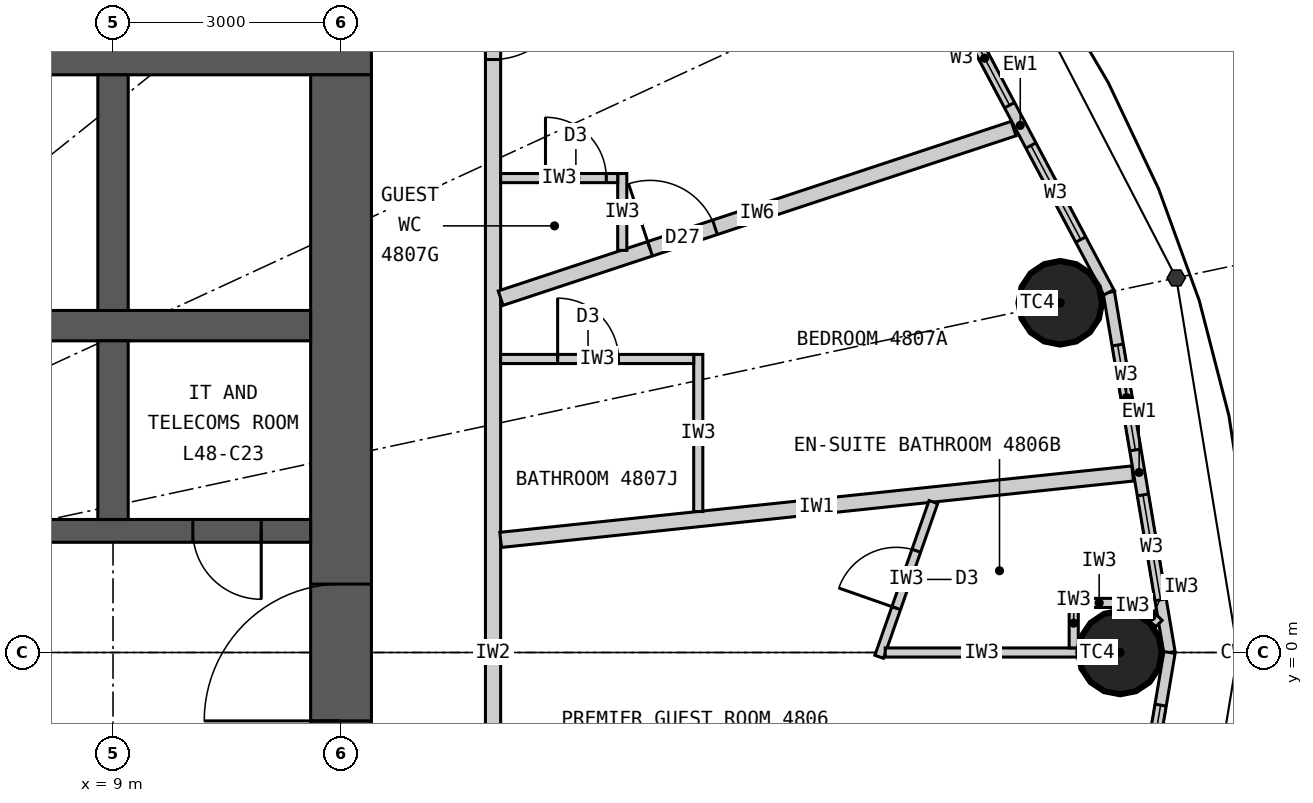
"""IFC4 building model, lengths in metres.
Left out: names, types, materials, properties, quantities, classifications, styles, units other than length and angle.
Written with IfcOpenShell. Run it as: python <this file> out.ifc"""

import sys

from ifc_helpers import new_model, si_unit, direction, frame, frame_2d, origin, origin_2d, place, context, subcontext, project, spatial, rectangle, circle, extrude, element, fill, save


model = new_model("IFC4")
c1 = context("Model", 3, precision=1e-05, world=origin(), true_north=direction((0.0, 1.0)))
c2 = subcontext(c1, "Body", "Model", "MODEL_VIEW")
j1 = project(units=[si_unit("LENGTHUNIT", "METRE"), si_unit("PLANEANGLEUNIT", "RADIAN")], contexts=[c1])
p1 = place(None, origin())
s1 = spatial("IfcSite", under=j1, at=p1, CompositionType="ELEMENT")
p2 = place(p1, origin())
s2 = spatial("IfcBuilding", under=s1, at=p2, CompositionType="ELEMENT")
p3 = place(p2, frame((0.0, 0.0, 179.7)))
s3 = spatial("IfcBuildingStorey", under=s2, at=p3, CompositionType="ELEMENT", Elevation=179.7)
for number, where, z_axis, x_axis in (
    (1, (22.25, 0.0, 0.0), (0.0, 0.0, 1.0), (1.0, 0.0, 0.0)),
    (2, (21.463, 4.601, 0.0), (0.0, 0.0, 1.0), (1.0, 0.0, 0.0)),
):
    element("IfcColumn", number, at=place(p3, frame(where, z_axis=z_axis, x_axis=x_axis)), inside=s3, PredefinedType="COLUMN", context=c2, shape_type="SweptSolid", body=[
        extrude(circle(Radius=0.55, at=origin_2d()), origin(), (0.0, 0.0, 1.0), 3.3),
    ])
p4 = place(p3, frame((-12.4, 8.0, 0.0), z_axis=(0.0, 0.0, 1.0), x_axis=(1.0, 0.0, 0.0)))
e3 = element("IfcWall", 3, at=p4, inside=s3, PredefinedType="SHEAR", context=c2, shape_type="SweptSolid", body=[
    extrude(rectangle(XDim=24.8, YDim=0.8, at=frame_2d((12.4, 0.0))), origin(), (0.0, 0.0, 1.0), 3.3),
])
p5 = place(p4, frame((11.1, 0.0, 0.0)))
e4 = element("IfcOpeningElement", 4, at=p5, cuts=e3, PredefinedType="OPENING", context=c2, shape_type="SweptSolid", body=[
    extrude(rectangle(XDim=1.2, YDim=2.2, at=frame_2d((0.6, 1.1))), frame((0.0, 0.41, 0.0), z_axis=(0.0, -1.0, 0.0), x_axis=(1.0, 0.0, 0.0)), (0.0, 0.0, 1.0), 0.82),
])
p6 = place(p4, frame((18.7, 0.0, 0.0)))
e5 = element("IfcOpeningElement", 5, at=p6, cuts=e3, PredefinedType="OPENING", context=c2, shape_type="SweptSolid", body=[
    extrude(rectangle(XDim=0.9, YDim=2.2, at=frame_2d((0.45, 1.1))), frame((0.0, 0.41, 0.0), z_axis=(0.0, -1.0, 0.0), x_axis=(1.0, 0.0, 0.0)), (0.0, 0.0, 1.0), 0.82),
])
p7 = place(p3, frame((12.0, -7.6, 0.0), z_axis=(0.0, 0.0, 1.0), x_axis=(0.0, 1.0, 0.0)))
e6 = element("IfcWall", 6, at=p7, inside=s3, PredefinedType="SHEAR", context=c2, shape_type="SweptSolid", body=[
    extrude(rectangle(XDim=15.2, YDim=0.8, at=frame_2d((7.6, 0.0))), origin(), (0.0, 0.0, 1.0), 3.3),
])
p8 = place(p7, frame((6.7, 0.0, 0.0)))
e7 = element("IfcOpeningElement", 7, at=p8, cuts=e6, PredefinedType="OPENING", context=c2, shape_type="SweptSolid", body=[
    extrude(rectangle(XDim=1.8, YDim=2.2, at=frame_2d((0.9, 1.1))), frame((0.0, 0.41, 0.0), z_axis=(0.0, -1.0, 0.0), x_axis=(1.0, 0.0, 0.0)), (0.0, 0.0, 1.0), 0.82),
])
p9 = place(p3, frame((-11.6, 4.3, 0.0), z_axis=(0.0, 0.0, 1.0), x_axis=(1.0, 0.0, 0.0)))
e8 = element("IfcWall", 8, at=p9, inside=s3, PredefinedType="SHEAR", context=c2, shape_type="SweptSolid", body=[
    extrude(rectangle(XDim=23.2, YDim=0.4, at=frame_2d((11.6, 0.0))), origin(), (0.0, 0.0, 1.0), 3.3),
])
p10 = place(p3, frame((-11.6, 1.6, 0.0), z_axis=(0.0, 0.0, 1.0), x_axis=(1.0, 0.0, 0.0)))
e9 = element("IfcWall", 9, at=p10, inside=s3, PredefinedType="SHEAR", context=c2, shape_type="SweptSolid", body=[
    extrude(rectangle(XDim=23.2, YDim=0.3, at=frame_2d((11.6, 0.0))), origin(), (0.0, 0.0, 1.0), 3.3),
])
p11 = place(p10, frame((9.55, 0.0, 0.0)))
e10 = element("IfcOpeningElement", 10, at=p11, cuts=e9, PredefinedType="OPENING", context=c2, shape_type="SweptSolid", body=[
    extrude(rectangle(XDim=1.1, YDim=2.2, at=frame_2d((0.55, 1.1))), frame((0.0, 0.16, 0.0), z_axis=(0.0, -1.0, 0.0), x_axis=(1.0, 0.0, 0.0)), (0.0, 0.0, 1.0), 0.32),
])
p12 = place(p10, frame((12.55, 0.0, 0.0)))
e11 = element("IfcOpeningElement", 11, at=p12, cuts=e9, PredefinedType="OPENING", context=c2, shape_type="SweptSolid", body=[
    extrude(rectangle(XDim=1.1, YDim=2.2, at=frame_2d((0.55, 1.1))), frame((0.0, 0.16, 0.0), z_axis=(0.0, -1.0, 0.0), x_axis=(1.0, 0.0, 0.0)), (0.0, 0.0, 1.0), 0.32),
])
p13 = place(p10, frame((0.65, 0.0, 0.0)))
e12 = element("IfcOpeningElement", 12, at=p13, cuts=e9, PredefinedType="OPENING", context=c2, shape_type="SweptSolid", body=[
    extrude(rectangle(XDim=0.9, YDim=2.2, at=frame_2d((0.45, 1.1))), frame((0.0, 0.16, 0.0), z_axis=(0.0, -1.0, 0.0), x_axis=(1.0, 0.0, 0.0)), (0.0, 0.0, 1.0), 0.32),
])
p14 = place(p10, frame((5.15, 0.0, 0.0)))
e13 = element("IfcOpeningElement", 13, at=p14, cuts=e9, PredefinedType="OPENING", context=c2, shape_type="SweptSolid", body=[
    extrude(rectangle(XDim=0.9, YDim=2.2, at=frame_2d((0.45, 1.1))), frame((0.0, 0.16, 0.0), z_axis=(0.0, -1.0, 0.0), x_axis=(1.0, 0.0, 0.0)), (0.0, 0.0, 1.0), 0.32),
])
p15 = place(p10, frame((21.65, 0.0, 0.0)))
e14 = element("IfcOpeningElement", 14, at=p15, cuts=e9, PredefinedType="OPENING", context=c2, shape_type="SweptSolid", body=[
    extrude(rectangle(XDim=0.9, YDim=2.2, at=frame_2d((0.45, 1.1))), frame((0.0, 0.16, 0.0), z_axis=(0.0, -1.0, 0.0), x_axis=(1.0, 0.0, 0.0)), (0.0, 0.0, 1.0), 0.32),
])
p16 = place(p3, frame((9.0, 4.5, 0.0), z_axis=(0.0, 0.0, 1.0), x_axis=(0.0, 1.0, 0.0)))
e15 = element("IfcWall", 15, at=p16, inside=s3, PredefinedType="SHEAR", context=c2, shape_type="SweptSolid", body=[
    extrude(rectangle(XDim=3.1, YDim=0.4, at=frame_2d((1.55, 0.0))), origin(), (0.0, 0.0, 1.0), 3.3),
])
p17 = place(p3, frame((9.0, 1.75, 0.0), z_axis=(0.0, 0.0, 1.0), x_axis=(0.0, 1.0, 0.0)))
e16 = element("IfcWall", 16, at=p17, inside=s3, PredefinedType="SHEAR", context=c2, shape_type="SweptSolid", body=[
    extrude(rectangle(XDim=2.35, YDim=0.4, at=frame_2d((1.175, 0.0))), origin(), (0.0, 0.0, 1.0), 3.3),
])
p18 = place(p3, frame((22.9, 0.0, 0.0), z_axis=(0.0, 0.0, 1.0), x_axis=(-0.166162111254, 0.986098449843, 0.0)))
e17 = element("IfcWall", 17, at=p18, inside=s3, PredefinedType="ELEMENTEDWALL", context=c2, shape_type="SweptSolid", body=[
    extrude(rectangle(XDim=4.805, YDim=0.15, at=frame_2d((2.402, 0.0))), origin(), (0.0, 0.0, 1.0), 3.12),
])
p19 = place(p18, frame((0.702, 0.0, 0.9)))
e18 = element("IfcOpeningElement", 18, at=p19, cuts=e17, PredefinedType="OPENING", context=c2, shape_type="SweptSolid", body=[
    extrude(rectangle(XDim=1.4, YDim=1.9, at=frame_2d((0.7, 0.95))), frame((0.0, 0.085, 0.0), z_axis=(0.0, -1.0, 0.0), x_axis=(1.0, 0.0, 0.0)), (0.0, 0.0, 1.0), 0.17),
])
p20 = place(p18, frame((2.702, 0.0, 0.9)))
e19 = element("IfcOpeningElement", 19, at=p20, cuts=e17, PredefinedType="OPENING", context=c2, shape_type="SweptSolid", body=[
    extrude(rectangle(XDim=1.4, YDim=1.9, at=frame_2d((0.7, 0.95))), frame((0.0, 0.085, 0.0), z_axis=(0.0, -1.0, 0.0), x_axis=(1.0, 0.0, 0.0)), (0.0, 0.0, 1.0), 0.17),
])
p21 = place(p3, frame((22.102, 4.738, 0.0), z_axis=(0.0, 0.0, 1.0), x_axis=(-0.468428906714, 0.883501193748, 0.0)))
e20 = element("IfcWall", 20, at=p21, inside=s3, PredefinedType="ELEMENTEDWALL", context=c2, shape_type="SweptSolid", body=[
    extrude(rectangle(XDim=4.974, YDim=0.15, at=frame_2d((2.487, 0.0))), origin(), (0.0, 0.0, 1.0), 3.12),
])
p22 = place(p21, frame((0.787, 0.0, 0.9)))
e21 = element("IfcOpeningElement", 21, at=p22, cuts=e20, PredefinedType="OPENING", context=c2, shape_type="SweptSolid", body=[
    extrude(rectangle(XDim=1.4, YDim=1.9, at=frame_2d((0.7, 0.95))), frame((0.0, 0.085, 0.0), z_axis=(0.0, -1.0, 0.0), x_axis=(1.0, 0.0, 0.0)), (0.0, 0.0, 1.0), 0.17),
])
p23 = place(p21, frame((2.787, 0.0, 0.9)))
e22 = element("IfcOpeningElement", 22, at=p23, cuts=e20, PredefinedType="OPENING", context=c2, shape_type="SweptSolid", body=[
    extrude(rectangle(XDim=1.4, YDim=1.9, at=frame_2d((0.7, 0.95))), frame((0.0, 0.085, 0.0), z_axis=(0.0, -1.0, 0.0), x_axis=(1.0, 0.0, 0.0)), (0.0, 0.0, 1.0), 0.17),
])
p24 = place(p3, frame((22.102, -4.738, 0.0), z_axis=(0.0, 0.0, 1.0), x_axis=(0.166162111254, 0.986098449843, 0.0)))
e23 = element("IfcWall", 23, at=p24, inside=s3, PredefinedType="ELEMENTEDWALL", context=c2, shape_type="SweptSolid", body=[
    extrude(rectangle(XDim=4.805, YDim=0.15, at=frame_2d((2.402, 0.0))), origin(), (0.0, 0.0, 1.0), 3.12),
])
p25 = place(p24, frame((0.702, 0.0, 0.9)))
e24 = element("IfcOpeningElement", 24, at=p25, cuts=e23, PredefinedType="OPENING", context=c2, shape_type="SweptSolid", body=[
    extrude(rectangle(XDim=1.4, YDim=1.9, at=frame_2d((0.7, 0.95))), frame((0.0, 0.085, 0.0), z_axis=(0.0, -1.0, 0.0), x_axis=(1.0, 0.0, 0.0)), (0.0, 0.0, 1.0), 0.17),
])
p26 = place(p24, frame((2.702, 0.0, 0.9)))
e25 = element("IfcOpeningElement", 25, at=p26, cuts=e23, PredefinedType="OPENING", context=c2, shape_type="SweptSolid", body=[
    extrude(rectangle(XDim=1.4, YDim=1.9, at=frame_2d((0.7, 0.95))), frame((0.0, 0.085, 0.0), z_axis=(0.0, -1.0, 0.0), x_axis=(1.0, 0.0, 0.0)), (0.0, 0.0, 1.0), 0.17),
])
p27 = place(p3, frame((14.0, -9.9, 0.0), z_axis=(0.0, 0.0, 1.0), x_axis=(0.0, 1.0, 0.0)))
e26 = element("IfcWall", 26, at=p27, inside=s3, PredefinedType="PARTITIONING", context=c2, shape_type="SweptSolid", body=[
    extrude(rectangle(XDim=19.8, YDim=0.2, at=frame_2d((9.9, 0.0))), origin(), (0.0, 0.0, 1.0), 3.12),
])
p28 = place(p27, frame((4.268, 0.0, 0.0)))
e27 = element("IfcOpeningElement", 27, at=p28, cuts=e26, PredefinedType="OPENING", context=c2, shape_type="SweptSolid", body=[
    extrude(rectangle(XDim=1.0, YDim=2.2, at=frame_2d((0.5, 1.1))), frame((0.0, 0.11, 0.0), z_axis=(0.0, -1.0, 0.0), x_axis=(1.0, 0.0, 0.0)), (0.0, 0.0, 1.0), 0.22),
])
p29 = place(p27, frame((7.177, 0.0, 0.0)))
e28 = element("IfcOpeningElement", 28, at=p29, cuts=e26, PredefinedType="OPENING", context=c2, shape_type="SweptSolid", body=[
    extrude(rectangle(XDim=1.0, YDim=2.2, at=frame_2d((0.5, 1.1))), frame((0.0, 0.11, 0.0), z_axis=(0.0, -1.0, 0.0), x_axis=(1.0, 0.0, 0.0)), (0.0, 0.0, 1.0), 0.22),
])
p30 = place(p27, frame((17.701, 0.0, 0.0)))
e29 = element("IfcOpeningElement", 29, at=p30, cuts=e26, PredefinedType="OPENING", context=c2, shape_type="SweptSolid", body=[
    extrude(rectangle(XDim=1.0, YDim=2.2, at=frame_2d((0.5, 1.1))), frame((0.0, 0.11, 0.0), z_axis=(0.0, -1.0, 0.0), x_axis=(1.0, 0.0, 0.0)), (0.0, 0.0, 1.0), 0.22),
])
p31 = place(p3, frame((14.1, 1.481, 0.0), z_axis=(0.0, 0.0, 1.0), x_axis=(0.994524794819, 0.104500873159, 0.0)))
e30 = element("IfcWall", 30, at=p31, inside=s3, PredefinedType="PARTITIONING", context=c2, shape_type="SweptSolid", body=[
    extrude(rectangle(XDim=8.362, YDim=0.2, at=frame_2d((4.181, 0.0))), origin(), (0.0, 0.0, 1.0), 2.37),
])
p32 = place(p3, frame((14.1, 4.661, 0.0), z_axis=(0.0, 0.0, 1.0), x_axis=(0.949453216399, 0.313908569285, 0.0)))
e31 = element("IfcWall", 31, at=p32, inside=s3, PredefinedType="PARTITIONING", context=c2, shape_type="SweptSolid", body=[
    extrude(rectangle(XDim=7.109, YDim=0.2, at=frame_2d((3.554, 0.0))), origin(), (0.0, 0.0, 1.0), 3.12),
])
p33 = place(p32, frame((2.07, 0.0, 0.0)))
e32 = element("IfcOpeningElement", 32, at=p33, cuts=e31, PredefinedType="OPENING", context=c2, shape_type="SweptSolid", body=[
    extrude(rectangle(XDim=0.9, YDim=2.1, at=frame_2d((0.45, 1.05))), frame((0.0, 0.11, 0.0), z_axis=(0.0, -1.0, 0.0), x_axis=(1.0, 0.0, 0.0)), (0.0, 0.0, 1.0), 0.22),
])
p34 = place(p3, frame((19.793, 1.979, 0.0), z_axis=(0.0, 0.0, 1.0), x_axis=(-0.330587353123, -0.943775398045, 0.0)))
e33 = element("IfcWall", 33, at=p34, inside=s3, PredefinedType="PARTITIONING", context=c2, shape_type="SweptSolid", body=[
    extrude(rectangle(XDim=2.157, YDim=0.12, at=frame_2d((1.079, 0.0))), origin(), (0.0, 0.0, 1.0), 3.12),
])
p35 = place(p34, frame((0.678, 0.0, 0.0)))
e34 = element("IfcOpeningElement", 34, at=p35, cuts=e33, PredefinedType="OPENING", context=c2, shape_type="SweptSolid", body=[
    extrude(rectangle(XDim=0.8, YDim=2.1, at=frame_2d((0.4, 1.05))), frame((0.0, 0.07, 0.0), z_axis=(0.0, -1.0, 0.0), x_axis=(1.0, 0.0, 0.0)), (0.0, 0.0, 1.0), 0.14),
])
p36 = place(p3, frame((19.16, 0.0, 0.0), z_axis=(0.0, 0.0, 1.0), x_axis=(1.0, 0.0, 0.0)))
e35 = element("IfcWall", 35, at=p36, inside=s3, PredefinedType="PARTITIONING", context=c2, shape_type="SweptSolid", body=[
    extrude(rectangle(XDim=2.54, YDim=0.12, at=frame_2d((1.27, 0.0))), origin(), (0.0, 0.0, 1.0), 2.27),
])
p37 = place(p3, frame((21.64, 0.06, 0.0), z_axis=(0.0, 0.0, 1.0), x_axis=(0.0, 1.0, 0.0)))
e36 = element("IfcWall", 36, at=p37, inside=s3, PredefinedType="PARTITIONING", context=c2, shape_type="SweptSolid", body=[
    extrude(rectangle(XDim=0.652, YDim=0.12, at=frame_2d((0.326, 0.0))), origin(), (0.0, 0.0, 1.0), 3.12),
])
p38 = place(p3, frame((21.7, 0.652, 0.0), z_axis=(0.0, 0.0, 1.0), x_axis=(1.0, 0.0, 0.0)))
e37 = element("IfcWall", 37, at=p38, inside=s3, PredefinedType="PARTITIONING", context=c2, shape_type="SweptSolid", body=[
    extrude(rectangle(XDim=0.55, YDim=0.12, at=frame_2d((0.275, 0.0))), origin(), (0.0, 0.0, 1.0), 3.12),
])
p39 = place(p3, frame((22.25, 0.652, 0.0), z_axis=(0.0, 0.0, 1.0), x_axis=(0.965922233104, -0.258832454679, 0.0)))
e38 = element("IfcWall", 38, at=p39, inside=s3, PredefinedType="PARTITIONING", context=c2, shape_type="SweptSolid", body=[
    extrude(rectangle(XDim=0.338, YDim=0.12, at=frame_2d((0.169, 0.0))), origin(), (0.0, 0.0, 1.0), 3.12),
])
p40 = place(p3, frame((22.576, 0.565, 0.0), z_axis=(0.0, 0.0, 1.0), x_axis=(0.706639272724, -0.707573980757, 0.0)))
e39 = element("IfcWall", 39, at=p40, inside=s3, PredefinedType="PARTITIONING", context=c2, shape_type="SweptSolid", body=[
    extrude(rectangle(XDim=0.261, YDim=0.12, at=frame_2d((0.131, 0.0))), origin(), (0.0, 0.0, 1.0), 3.12),
])
p41 = place(p3, frame((16.7, 1.855, 0.0), z_axis=(0.0, 0.0, 1.0), x_axis=(0.0, 1.0, 0.0)))
e40 = element("IfcWall", 40, at=p41, inside=s3, PredefinedType="PARTITIONING", context=c2, shape_type="SweptSolid", body=[
    extrude(rectangle(XDim=2.067, YDim=0.12, at=frame_2d((1.033, 0.0))), origin(), (0.0, 0.0, 1.0), 3.12),
])
p42 = place(p3, frame((14.1, 3.862, 0.0), z_axis=(0.0, 0.0, 1.0), x_axis=(1.0, 0.0, 0.0)))
e41 = element("IfcWall", 41, at=p42, inside=s3, PredefinedType="PARTITIONING", context=c2, shape_type="SweptSolid", body=[
    extrude(rectangle(XDim=2.54, YDim=0.12, at=frame_2d((1.27, 0.0))), origin(), (0.0, 0.0, 1.0), 2.27),
])
p43 = place(p42, frame((0.75, 0.0, 0.0)))
e42 = element("IfcOpeningElement", 42, at=p43, cuts=e41, PredefinedType="OPENING", context=c2, shape_type="SweptSolid", body=[
    extrude(rectangle(XDim=0.8, YDim=2.1, at=frame_2d((0.4, 1.05))), frame((0.0, 0.07, 0.0), z_axis=(0.0, -1.0, 0.0), x_axis=(1.0, 0.0, 0.0)), (0.0, 0.0, 1.0), 0.14),
])
p44 = place(p3, frame((15.7, 5.291, 0.0), z_axis=(0.0, 0.0, 1.0), x_axis=(0.0, 1.0, 0.0)))
e43 = element("IfcWall", 43, at=p44, inside=s3, PredefinedType="PARTITIONING", context=c2, shape_type="SweptSolid", body=[
    extrude(rectangle(XDim=1.011, YDim=0.12, at=frame_2d((0.505, 0.0))), origin(), (0.0, 0.0, 1.0), 3.12),
])
p45 = place(p3, frame((14.1, 6.241, 0.0), z_axis=(0.0, 0.0, 1.0), x_axis=(1.0, 0.0, 0.0)))
e44 = element("IfcWall", 44, at=p45, inside=s3, PredefinedType="PARTITIONING", context=c2, shape_type="SweptSolid", body=[
    extrude(rectangle(XDim=1.54, YDim=0.12, at=frame_2d((0.77, 0.0))), origin(), (0.0, 0.0, 1.0), 3.12),
])
p46 = place(p45, frame((0.59, 0.0, 0.0)))
e45 = element("IfcOpeningElement", 45, at=p46, cuts=e44, PredefinedType="OPENING", context=c2, shape_type="SweptSolid", body=[
    extrude(rectangle(XDim=0.8, YDim=2.1, at=frame_2d((0.4, 1.05))), frame((0.0, 0.07, 0.0), z_axis=(0.0, -1.0, 0.0), x_axis=(1.0, 0.0, 0.0)), (0.0, 0.0, 1.0), 0.14),
])
p47 = place(p19, origin())
e46 = element("IfcWindow", 46, at=p47, inside=s3, PartitioningType="SINGLE_PANEL", PredefinedType="WINDOW", context=c2, shape_type="SweptSolid", body=[
    extrude(rectangle(XDim=1.4, YDim=1.9, at=frame_2d((0.7, 0.95))), frame((0.0, 0.03, 0.0), z_axis=(0.0, -1.0, 0.0), x_axis=(1.0, 0.0, 0.0)), (0.0, 0.0, 1.0), 0.06),
])
fill(e18, e46)
p48 = place(p20, origin())
e47 = element("IfcWindow", 47, at=p48, inside=s3, PartitioningType="SINGLE_PANEL", PredefinedType="WINDOW", context=c2, shape_type="SweptSolid", body=[
    extrude(rectangle(XDim=1.4, YDim=1.9, at=frame_2d((0.7, 0.95))), frame((0.0, 0.03, 0.0), z_axis=(0.0, -1.0, 0.0), x_axis=(1.0, 0.0, 0.0)), (0.0, 0.0, 1.0), 0.06),
])
fill(e19, e47)
p49 = place(p22, origin())
e48 = element("IfcWindow", 48, at=p49, inside=s3, PartitioningType="SINGLE_PANEL", PredefinedType="WINDOW", context=c2, shape_type="SweptSolid", body=[
    extrude(rectangle(XDim=1.4, YDim=1.9, at=frame_2d((0.7, 0.95))), frame((0.0, 0.03, 0.0), z_axis=(0.0, -1.0, 0.0), x_axis=(1.0, 0.0, 0.0)), (0.0, 0.0, 1.0), 0.06),
])
fill(e21, e48)
p50 = place(p23, origin())
e49 = element("IfcWindow", 49, at=p50, inside=s3, PartitioningType="SINGLE_PANEL", PredefinedType="WINDOW", context=c2, shape_type="SweptSolid", body=[
    extrude(rectangle(XDim=1.4, YDim=1.9, at=frame_2d((0.7, 0.95))), frame((0.0, 0.03, 0.0), z_axis=(0.0, -1.0, 0.0), x_axis=(1.0, 0.0, 0.0)), (0.0, 0.0, 1.0), 0.06),
])
fill(e22, e49)
p51 = place(p26, origin())
e50 = element("IfcWindow", 50, at=p51, inside=s3, PartitioningType="SINGLE_PANEL", PredefinedType="WINDOW", context=c2, shape_type="SweptSolid", body=[
    extrude(rectangle(XDim=1.4, YDim=1.9, at=frame_2d((0.7, 0.95))), frame((0.0, 0.03, 0.0), z_axis=(0.0, -1.0, 0.0), x_axis=(1.0, 0.0, 0.0)), (0.0, 0.0, 1.0), 0.06),
])
fill(e25, e50)
p52 = place(p35, origin())
e51 = element("IfcDoor", 51, at=p52, inside=s3, OperationType="SINGLE_SWING_RIGHT", PredefinedType="DOOR", context=c2, shape_type="SweptSolid", body=[
    extrude(rectangle(XDim=0.8, YDim=2.1, at=frame_2d((0.4, 1.05))), frame((0.0, 0.025, 0.0), z_axis=(0.0, -1.0, 0.0), x_axis=(1.0, 0.0, 0.0)), (0.0, 0.0, 1.0), 0.05),
])
fill(e34, e51)
p53 = place(p43, origin())
e52 = element("IfcDoor", 52, at=p53, inside=s3, OperationType="SINGLE_SWING_LEFT", PredefinedType="DOOR", context=c2, shape_type="SweptSolid", body=[
    extrude(rectangle(XDim=0.8, YDim=2.1, at=frame_2d((0.4, 1.05))), frame((0.0, 0.025, 0.0), z_axis=(0.0, -1.0, 0.0), x_axis=(1.0, 0.0, 0.0)), (0.0, 0.0, 1.0), 0.05),
])
fill(e42, e52)
p54 = place(p46, origin())
e53 = element("IfcDoor", 53, at=p54, inside=s3, OperationType="SINGLE_SWING_LEFT", PredefinedType="DOOR", context=c2, shape_type="SweptSolid", body=[
    extrude(rectangle(XDim=0.8, YDim=2.1, at=frame_2d((0.4, 1.05))), frame((0.0, 0.025, 0.0), z_axis=(0.0, -1.0, 0.0), x_axis=(1.0, 0.0, 0.0)), (0.0, 0.0, 1.0), 0.05),
])
fill(e45, e53)
p55 = place(p30, origin())
e54 = element("IfcDoor", 54, at=p55, inside=s3, OperationType="SINGLE_SWING_RIGHT", PredefinedType="DOOR", context=c2, shape_type="SweptSolid", body=[
    extrude(rectangle(XDim=1.0, YDim=2.2, at=frame_2d((0.5, 1.1))), frame((0.0, 0.025, 0.0), z_axis=(0.0, -1.0, 0.0), x_axis=(1.0, 0.0, 0.0)), (0.0, 0.0, 1.0), 0.05),
])
fill(e29, e54)
p56 = place(p33, origin())
e55 = element("IfcDoor", 55, at=p56, inside=s3, OperationType="SINGLE_SWING_LEFT", PredefinedType="DOOR", context=c2, shape_type="SweptSolid", body=[
    extrude(rectangle(XDim=0.9, YDim=2.1, at=frame_2d((0.45, 1.05))), frame((0.0, 0.025, 0.0), z_axis=(0.0, -1.0, 0.0), x_axis=(1.0, 0.0, 0.0)), (0.0, 0.0, 1.0), 0.05),
])
fill(e32, e55)
p57 = place(p15, origin())
e56 = element("IfcDoor", 56, at=p57, inside=s3, OperationType="SINGLE_SWING_RIGHT", PredefinedType="DOOR", context=c2, shape_type="SweptSolid", body=[
    extrude(rectangle(XDim=0.9, YDim=2.2, at=frame_2d((0.45, 1.1))), frame((0.0, 0.025, 0.0), z_axis=(0.0, -1.0, 0.0), x_axis=(1.0, 0.0, 0.0)), (0.0, 0.0, 1.0), 0.05),
])
fill(e14, e56)
p58 = place(p8, origin())
e57 = element("IfcDoor", 57, at=p58, inside=s3, OperationType="DOUBLE_DOOR_DOUBLE_SWING", PredefinedType="DOOR", context=c2, shape_type="SweptSolid", body=[
    extrude(rectangle(XDim=1.8, YDim=2.2, at=frame_2d((0.9, 1.1))), frame((0.0, 0.025, 0.0), z_axis=(0.0, -1.0, 0.0), x_axis=(1.0, 0.0, 0.0)), (0.0, 0.0, 1.0), 0.05),
])
fill(e7, e57)
save(model, sys.argv[1])
